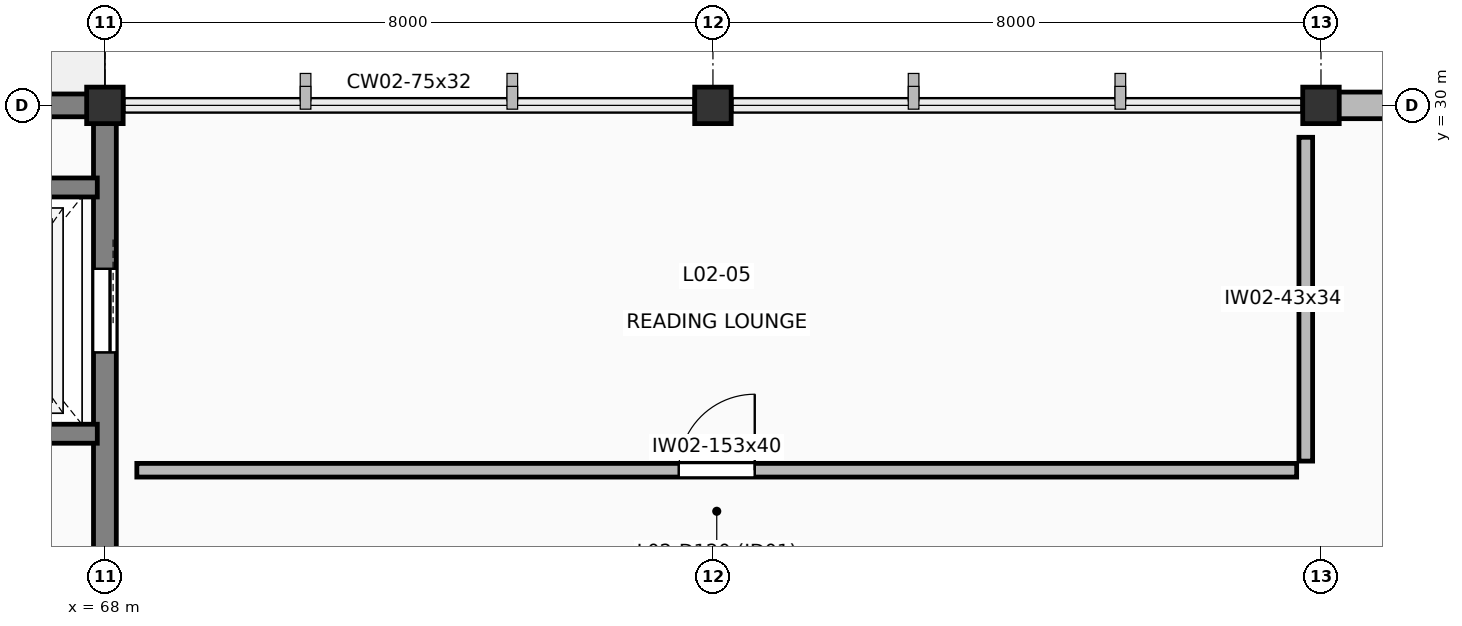
"""IFC4 building model, lengths in metres.
Left out: names, types, materials, properties, quantities, classifications, styles, units other than length and angle.
Written with IfcOpenShell. Run it as: python <this file> out.ifc"""

import sys

from ifc_helpers import new_model, si_unit, direction, frame, frame_2d, origin, origin_2d, place, context, subcontext, project, spatial, rectangle, extrude, element, fill, save


model = new_model("IFC4")
c1 = context("Model", 3, precision=1e-05, world=origin(), true_north=direction((0.0, 1.0)))
c2 = subcontext(c1, "Body", "Model", "MODEL_VIEW")
j1 = project(units=[si_unit("LENGTHUNIT", "METRE"), si_unit("PLANEANGLEUNIT", "RADIAN")], contexts=[c1])
p1 = place(None, origin())
s1 = spatial("IfcSite", under=j1, at=p1, CompositionType="ELEMENT")
p2 = place(p1, origin())
s2 = spatial("IfcBuilding", under=s1, at=p2, CompositionType="ELEMENT")
p3 = place(p2, frame((0.0, 0.0, 9.6)))
s3 = spatial("IfcBuildingStorey", under=s2, at=p3, CompositionType="ELEMENT", Elevation=9.6)
for number, where, z_axis, x_axis in (
    (1, (68.0, 30.0, 0.0), (0.0, 0.0, 1.0), (1.0, 0.0, 0.0)),
    (2, (76.0, 30.0, 0.0), (0.0, 0.0, 1.0), (1.0, 0.0, 0.0)),
    (3, (84.0, 30.0, 0.0), (0.0, 0.0, 1.0), (1.0, 0.0, 0.0)),
):
    element("IfcColumn", number, at=place(p3, frame(where, z_axis=z_axis, x_axis=x_axis)), inside=s3, PredefinedType="COLUMN", context=c2, shape_type="SweptSolid", body=[
        extrude(rectangle(XDim=0.48, YDim=0.48, at=origin_2d()), origin(), (0.0, 0.0, 1.0), 4.2),
    ])
p4 = place(p3, frame((60.0, 30.0, 0.0), z_axis=(0.0, 0.0, 1.0), x_axis=(1.0, 0.0, 0.0)))
e4 = element("IfcWall", 4, at=p4, inside=s3, PredefinedType="SOLIDWALL", context=c2, shape_type="SweptSolid", body=[
    extrude(rectangle(XDim=8.0, YDim=0.3, at=frame_2d((4.0, 0.0))), origin(), (0.0, 0.0, 1.0), 4.2),
])
p5 = place(p3, frame((84.0, 30.0, 0.0), z_axis=(0.0, 0.0, 1.0), x_axis=(1.0, 0.0, 0.0)))
e5 = element("IfcWall", 5, at=p5, inside=s3, PredefinedType="SOLIDWALL", context=c2, shape_type="SweptSolid", body=[
    extrude(rectangle(XDim=8.0, YDim=0.35, at=frame_2d((4.0, 0.0))), origin(), (0.0, 0.0, 1.0), 3.245),
])
p6 = place(p3, frame((68.0, 30.0, 0.0), z_axis=(0.0, 0.0, 1.0), x_axis=(0.0, -1.0, 0.0)))
e6 = element("IfcWall", 6, at=p6, inside=s3, PredefinedType="SHEAR", context=c2, shape_type="SweptSolid", body=[
    extrude(rectangle(XDim=8.0, YDim=0.3, at=frame_2d((4.0, 0.0))), origin(), (0.0, 0.0, 1.0), 4.2),
])
p7 = place(p6, frame((6.3, 0.0, 0.0)))
e7 = element("IfcOpeningElement", 7, at=p7, cuts=e6, PredefinedType="OPENING", context=c2, shape_type="SweptSolid", body=[
    extrude(rectangle(XDim=1.1, YDim=2.2, at=frame_2d((0.55, 1.1))), frame((0.0, 0.16, 0.0), z_axis=(0.0, -1.0, 0.0), x_axis=(1.0, 0.0, 0.0)), (0.0, 0.0, 1.0), 0.32),
])
p8 = place(p6, frame((2.15, 0.0, 0.0)))
e8 = element("IfcOpeningElement", 8, at=p8, cuts=e6, PredefinedType="OPENING", context=c2, shape_type="SweptSolid", body=[
    extrude(rectangle(XDim=1.1, YDim=2.2, at=frame_2d((0.55, 1.1))), frame((0.0, 0.16, 0.0), z_axis=(0.0, -1.0, 0.0), x_axis=(1.0, 0.0, 0.0)), (0.0, 0.0, 1.0), 0.32),
])
for number, where, z_axis, x_axis in (
    (9, (65.2, 25.68, 0.0), (0.0, 0.0, 1.0), (1.0, 0.0, 0.0)),
    (10, (65.2, 28.92, 0.0), (0.0, 0.0, 1.0), (1.0, 0.0, 0.0)),
):
    element("IfcWall", number, at=place(p3, frame(where, z_axis=z_axis, x_axis=x_axis)), inside=s3, PredefinedType="SHEAR", context=c2, shape_type="SweptSolid", body=[
        extrude(rectangle(XDim=2.7, YDim=0.25, at=frame_2d((1.35, 0.0))), origin(), (0.0, 0.0, 1.0), 4.2),
    ])
p9 = place(p3, frame((68.42, 25.2, 0.0), z_axis=(0.0, 0.0, 1.0), x_axis=(1.0, 0.0, 0.0)))
e11 = element("IfcWall", 11, at=p9, inside=s3, PredefinedType="PARTITIONING", context=c2, shape_type="SweptSolid", body=[
    extrude(rectangle(XDim=15.26, YDim=0.18, at=frame_2d((7.63, 0.0))), origin(), (0.0, 0.0, 1.0), 3.98),
])
p10 = place(p9, frame((7.13, 0.0, 0.0)))
e12 = element("IfcOpeningElement", 12, at=p10, cuts=e11, PredefinedType="OPENING", context=c2, shape_type="SweptSolid", body=[
    extrude(rectangle(XDim=1.0, YDim=2.15, at=frame_2d((0.5, 1.075))), frame((0.0, 0.1, 0.0), z_axis=(0.0, -1.0, 0.0), x_axis=(1.0, 0.0, 0.0)), (0.0, 0.0, 1.0), 0.2),
])
p11 = place(p3, frame((83.8, 25.32, 0.0), z_axis=(0.0, 0.0, 1.0), x_axis=(0.0, 1.0, 0.0)))
e13 = element("IfcWall", 13, at=p11, inside=s3, PredefinedType="PARTITIONING", context=c2, shape_type="SweptSolid", body=[
    extrude(rectangle(XDim=4.26, YDim=0.18, at=frame_2d((2.13, 0.0))), origin(), (0.0, 0.0, 1.0), 3.365),
])
p12 = place(p8, origin())
e14 = element("IfcDoor", 14, at=p12, inside=s3, OperationType="SLIDING_TO_LEFT", PredefinedType="DOOR", context=c2, shape_type="SweptSolid", body=[
    extrude(rectangle(XDim=1.1, YDim=2.2, at=frame_2d((0.55, 1.1))), frame((0.0, 0.025, 0.0), z_axis=(0.0, -1.0, 0.0), x_axis=(1.0, 0.0, 0.0)), (0.0, 0.0, 1.0), 0.05),
])
fill(e8, e14)
p13 = place(p10, origin())
e15 = element("IfcDoor", 15, at=p13, inside=s3, OperationType="SINGLE_SWING_RIGHT", PredefinedType="DOOR", context=c2, shape_type="SweptSolid", body=[
    extrude(rectangle(XDim=1.0, YDim=2.15, at=frame_2d((0.5, 1.075))), frame((0.0, 0.025, 0.0), z_axis=(0.0, -1.0, 0.0), x_axis=(1.0, 0.0, 0.0)), (0.0, 0.0, 1.0), 0.05),
])
fill(e12, e15)
save(model, sys.argv[1])
